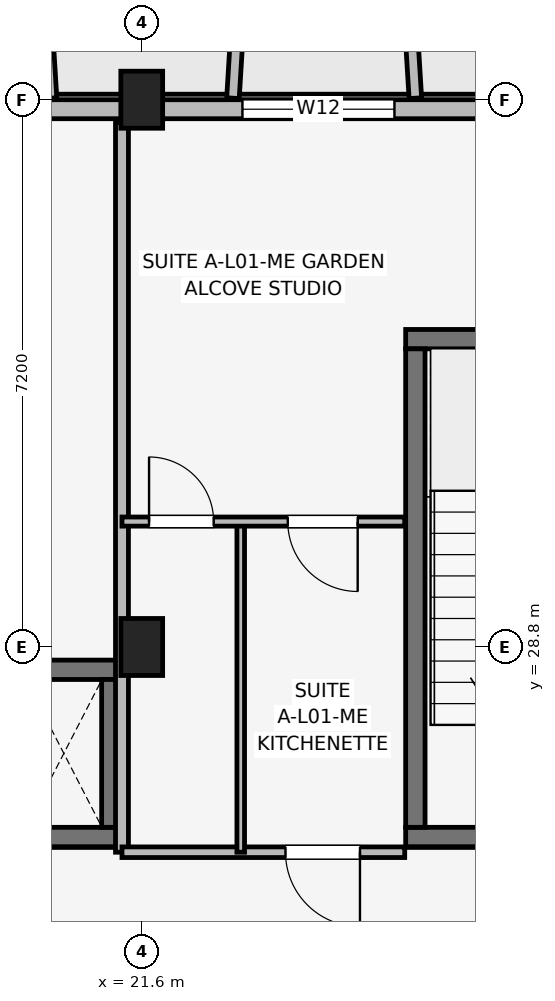
"""IFC4 building model, lengths in metres.
Left out: names, types, materials, properties, quantities, classifications, styles, units other than length and angle.
Written with IfcOpenShell. Run it as: python <this file> out.ifc"""

import sys

from ifc_helpers import new_model, si_unit, direction, frame, frame_2d, origin, origin_2d, place, context, subcontext, project, spatial, rectangle, extrude, element, fill, save


model = new_model("IFC4")
c1 = context("Model", 3, precision=1e-05, world=origin(), true_north=direction((0.0, 1.0)))
c2 = subcontext(c1, "Body", "Model", "MODEL_VIEW")
j1 = project(units=[si_unit("LENGTHUNIT", "METRE"), si_unit("PLANEANGLEUNIT", "RADIAN")], contexts=[c1])
p1 = place(None, origin())
s1 = spatial("IfcSite", under=j1, at=p1, CompositionType="ELEMENT")
p2 = place(p1, origin())
s2 = spatial("IfcBuilding", under=s1, at=p2, CompositionType="ELEMENT")
p3 = place(p2, frame((0.0, 0.0, 4.5)))
s3 = spatial("IfcBuildingStorey", under=s2, at=p3, CompositionType="ELEMENT", Elevation=4.5)
for number, where, z_axis, x_axis in (
    (1, (21.6, 28.8, 0.0), (0.0, 0.0, 1.0), (1.0, 0.0, 0.0)),
    (2, (21.6, 36.0, 0.0), (0.0, 0.0, 1.0), (1.0, 0.0, 0.0)),
):
    element("IfcColumn", number, at=place(p3, frame(where, z_axis=z_axis, x_axis=x_axis)), inside=s3, PredefinedType="COLUMN", context=c2, shape_type="SweptSolid", body=[
        extrude(rectangle(XDim=0.55, YDim=0.75, at=origin_2d()), origin(), (0.0, 0.0, 1.0), 4.2),
    ])
p4 = place(p3, frame((25.073, 26.3, 0.0), z_axis=(0.0, 0.0, 1.0), x_axis=(1.0, 0.0, 0.0)))
e3 = element("IfcWall", 3, at=p4, inside=s3, PredefinedType="SHEAR", context=c2, shape_type="SweptSolid", body=[
    extrude(rectangle(XDim=3.305, YDim=0.255, at=frame_2d((1.652, 0.0))), origin(), (0.0, 0.0, 1.0), 4.2),
])
p5 = place(p4, frame((1.127, 0.0, 0.0)))
e4 = element("IfcOpeningElement", 4, at=p5, cuts=e3, PredefinedType="OPENING", context=c2, shape_type="SweptSolid", body=[
    extrude(rectangle(XDim=1.05, YDim=2.12, at=frame_2d((0.525, 1.06))), frame((0.0, 0.137, 0.0), z_axis=(0.0, -1.0, 0.0), x_axis=(1.0, 0.0, 0.0)), (0.0, 0.0, 1.0), 0.275),
])
p6 = place(p3, frame((25.073, 32.85, 0.0), z_axis=(0.0, 0.0, 1.0), x_axis=(1.0, 0.0, 0.0)))
e5 = element("IfcWall", 5, at=p6, inside=s3, PredefinedType="SHEAR", context=c2, shape_type="SweptSolid", body=[
    extrude(rectangle(XDim=3.305, YDim=0.255, at=frame_2d((1.652, 0.0))), origin(), (0.0, 0.0, 1.0), 4.2),
])
p7 = place(p3, frame((25.2, 26.427, 0.0), z_axis=(0.0, 0.0, 1.0), x_axis=(0.0, 1.0, 0.0)))
e6 = element("IfcWall", 6, at=p7, inside=s3, PredefinedType="SHEAR", context=c2, shape_type="SweptSolid", body=[
    extrude(rectangle(XDim=6.295, YDim=0.255, at=frame_2d((3.147, 0.0))), origin(), (0.0, 0.0, 1.0), 4.2),
])
for number, where, z_axis, x_axis in (
    (7, (19.522, 26.3, 0.0), (0.0, 0.0, 1.0), (1.0, 0.0, 0.0)),
    (8, (19.522, 28.5, 0.0), (0.0, 0.0, 1.0), (1.0, 0.0, 0.0)),
):
    element("IfcWall", number, at=place(p3, frame(where, z_axis=z_axis, x_axis=x_axis)), inside=s3, PredefinedType="SHEAR", context=c2, shape_type="SweptSolid", body=[
        extrude(rectangle(XDim=1.805, YDim=0.255, at=frame_2d((0.902, 0.0))), origin(), (0.0, 0.0, 1.0), 4.2),
    ])
p8 = place(p3, frame((21.2, 26.427, 0.0), z_axis=(0.0, 0.0, 1.0), x_axis=(0.0, 1.0, 0.0)))
e9 = element("IfcWall", 9, at=p8, inside=s3, PredefinedType="SHEAR", context=c2, shape_type="SweptSolid", body=[
    extrude(rectangle(XDim=1.945, YDim=0.255, at=frame_2d((0.973, 0.0))), origin(), (0.0, 0.0, 1.0), 4.2),
])
p9 = place(p3, frame((32.6, 35.875, 0.0), z_axis=(0.0, 0.0, 1.0), x_axis=(-1.0, 0.0, 0.0)))
e10 = element("IfcWall", 10, at=p9, inside=s3, PredefinedType="SOLIDWALL", context=c2, shape_type="SweptSolid", body=[
    extrude(rectangle(XDim=29.2, YDim=0.25, at=frame_2d((14.6, 0.0))), origin(), (0.0, 0.0, 1.0), 3.48),
])
p10 = place(p9, frame((28.7, 0.0, 0.0), z_axis=(0.0, 0.0, 1.0), x_axis=(-1.0, 0.0, 0.0)))
e11 = element("IfcOpeningElement", 11, at=p10, cuts=e10, PredefinedType="OPENING", context=c2, shape_type="SweptSolid", body=[
    extrude(rectangle(XDim=1.8, YDim=2.15, at=frame_2d((0.9, 1.075))), frame((0.0, 0.135, 0.0), z_axis=(0.0, -1.0, 0.0), x_axis=(1.0, 0.0, 0.0)), (0.0, 0.0, 1.0), 0.27),
])
p11 = place(p9, frame((2.15, 0.0, 0.0), z_axis=(0.0, 0.0, 1.0), x_axis=(-1.0, 0.0, 0.0)))
e12 = element("IfcOpeningElement", 12, at=p11, cuts=e10, PredefinedType="OPENING", context=c2, shape_type="SweptSolid", body=[
    extrude(rectangle(XDim=1.5, YDim=2.15, at=frame_2d((0.75, 1.075))), frame((0.0, 0.135, 0.0), z_axis=(0.0, -1.0, 0.0), x_axis=(1.0, 0.0, 0.0)), (0.0, 0.0, 1.0), 0.27),
])
p12 = place(p9, frame((14.955, 0.0, 0.5)))
e13 = element("IfcOpeningElement", 13, at=p12, cuts=e10, PredefinedType="OPENING", context=c2, shape_type="SweptSolid", body=[
    extrude(rectangle(XDim=0.9, YDim=1.8, at=frame_2d((0.45, 0.9))), frame((0.0, 0.135, 0.0), z_axis=(0.0, -1.0, 0.0), x_axis=(1.0, 0.0, 0.0)), (0.0, 0.0, 1.0), 0.27),
])
p13 = place(p9, frame((7.675, 0.0, 0.7)))
e14 = element("IfcOpeningElement", 14, at=p13, cuts=e10, PredefinedType="OPENING", context=c2, shape_type="SweptSolid", body=[
    extrude(rectangle(XDim=2.0, YDim=1.65, at=frame_2d((1.0, 0.825))), frame((0.0, 0.135, 0.0), z_axis=(0.0, -1.0, 0.0), x_axis=(1.0, 0.0, 0.0)), (0.0, 0.0, 1.0), 0.27),
])
p14 = place(p9, frame((19.57, 0.0, 0.7)))
e15 = element("IfcOpeningElement", 15, at=p14, cuts=e10, PredefinedType="OPENING", context=c2, shape_type="SweptSolid", body=[
    extrude(rectangle(XDim=1.86, YDim=1.6, at=frame_2d((0.93, 0.8))), frame((0.0, 0.135, 0.0), z_axis=(0.0, -1.0, 0.0), x_axis=(1.0, 0.0, 0.0)), (0.0, 0.0, 1.0), 0.27),
])
p15 = place(p3, frame((20.4, 36.02, 0.0), z_axis=(0.0, 0.0, 1.0), x_axis=(-0.061046865508, 0.998134900808, 0.0)))
e16 = element("IfcWall", 16, at=p15, inside=s3, PredefinedType="ELEMENTEDWALL", context=c2, shape_type="SweptSolid", body=[
    extrude(rectangle(XDim=1.964, YDim=0.165, at=frame_2d((0.982, 0.0))), origin(), (0.0, 0.0, 1.0), 3.6),
])
for number, where, z_axis, x_axis in (
    (17, (22.8, 36.02, 0.0), (0.0, 0.0, 1.0), (0.061, 0.998, 0.0)),
    (18, (25.2, 36.02, 0.0), (0.0, 0.0, 1.0), (-0.061, 0.998, 0.0)),
):
    element("IfcWall", number, at=place(p3, frame(where, z_axis=z_axis, x_axis=x_axis)), inside=s3, PredefinedType="ELEMENTEDWALL", context=c2, shape_type="SweptSolid", body=[
        extrude(rectangle(XDim=1.964, YDim=0.165, at=frame_2d((0.982, 0.0))), origin(), (0.0, 0.0, 1.0), 3.63),
    ])
p16 = place(p3, frame((21.34, 26.1, 0.0), z_axis=(0.0, 0.0, 1.0), x_axis=(0.0, 1.0, 0.0)))
e19 = element("IfcWall", 19, at=p16, inside=s3, PredefinedType="PARTITIONING", context=c2, shape_type="SweptSolid", body=[
    extrude(rectangle(XDim=9.6, YDim=0.17, at=frame_2d((4.8, 0.0))), origin(), (0.0, 0.0, 1.0), 3.25),
])
p17 = place(p3, frame((21.34, 26.1, 0.0), z_axis=(0.0, 0.0, 1.0), x_axis=(1.0, 0.0, 0.0)))
e20 = element("IfcWall", 20, at=p17, inside=s3, PredefinedType="PARTITIONING", context=c2, shape_type="SweptSolid", body=[
    extrude(rectangle(XDim=3.72, YDim=0.14, at=frame_2d((1.86, 0.0))), origin(), (0.0, 0.0, 1.0), 3.25),
])
p18 = place(p17, frame((3.131, 0.0, 0.0), z_axis=(0.0, 0.0, 1.0), x_axis=(-1.0, 0.0, 0.0)))
e21 = element("IfcOpeningElement", 21, at=p18, cuts=e20, PredefinedType="OPENING", context=c2, shape_type="SweptSolid", body=[
    extrude(rectangle(XDim=0.98, YDim=2.1, at=frame_2d((0.49, 1.05))), frame((0.0, 0.08, 0.0), z_axis=(0.0, -1.0, 0.0), x_axis=(1.0, 0.0, 0.0)), (0.0, 0.0, 1.0), 0.16),
])
p19 = place(p3, frame((22.902, 26.1, 0.0), z_axis=(0.0, 0.0, 1.0), x_axis=(0.0, 1.0, 0.0)))
e22 = element("IfcWall", 22, at=p19, inside=s3, PredefinedType="PARTITIONING", context=c2, shape_type="SweptSolid", body=[
    extrude(rectangle(XDim=4.35, YDim=0.1, at=frame_2d((2.175, 0.0))), origin(), (0.0, 0.0, 1.0), 3.25),
])
p20 = place(p3, frame((21.34, 30.45, 0.0), z_axis=(0.0, 0.0, 1.0), x_axis=(1.0, 0.0, 0.0)))
e23 = element("IfcWall", 23, at=p20, inside=s3, PredefinedType="PARTITIONING", context=c2, shape_type="SweptSolid", body=[
    extrude(rectangle(XDim=3.72, YDim=0.12, at=frame_2d((1.86, 0.0))), origin(), (0.0, 0.0, 1.0), 3.25),
])
p21 = place(p20, frame((0.356, 0.0, 0.0)))
e24 = element("IfcOpeningElement", 24, at=p21, cuts=e23, PredefinedType="OPENING", context=c2, shape_type="SweptSolid", body=[
    extrude(rectangle(XDim=0.85, YDim=2.08, at=frame_2d((0.425, 1.04))), frame((0.0, 0.07, 0.0), z_axis=(0.0, -1.0, 0.0), x_axis=(1.0, 0.0, 0.0)), (0.0, 0.0, 1.0), 0.14),
])
p22 = place(p20, frame((3.101, 0.0, 0.0), z_axis=(0.0, 0.0, 1.0), x_axis=(-1.0, 0.0, 0.0)))
e25 = element("IfcOpeningElement", 25, at=p22, cuts=e23, PredefinedType="OPENING", context=c2, shape_type="SweptSolid", body=[
    extrude(rectangle(XDim=0.92, YDim=2.08, at=frame_2d((0.46, 1.04))), frame((0.0, 0.07, 0.0), z_axis=(0.0, -1.0, 0.0), x_axis=(1.0, 0.0, 0.0)), (0.0, 0.0, 1.0), 0.14),
])
p23 = place(p13, origin())
e26 = element("IfcWindow", 26, at=p23, inside=s3, PartitioningType="SINGLE_PANEL", PredefinedType="WINDOW", context=c2, shape_type="SweptSolid", body=[
    extrude(rectangle(XDim=2.0, YDim=1.65, at=frame_2d((1.0, 0.825))), frame((0.0, 0.03, 0.0), z_axis=(0.0, -1.0, 0.0), x_axis=(1.0, 0.0, 0.0)), (0.0, 0.0, 1.0), 0.06),
])
fill(e14, e26)
p24 = place(p18, origin())
e27 = element("IfcDoor", 27, at=p24, inside=s3, OperationType="SINGLE_SWING_RIGHT", PredefinedType="DOOR", context=c2, shape_type="SweptSolid", body=[
    extrude(rectangle(XDim=0.98, YDim=2.1, at=frame_2d((0.49, 1.05))), frame((0.0, 0.025, 0.0), z_axis=(0.0, -1.0, 0.0), x_axis=(1.0, 0.0, 0.0)), (0.0, 0.0, 1.0), 0.05),
])
fill(e21, e27)
p25 = place(p21, origin())
e28 = element("IfcDoor", 28, at=p25, inside=s3, OperationType="SINGLE_SWING_LEFT", PredefinedType="DOOR", context=c2, shape_type="SweptSolid", body=[
    extrude(rectangle(XDim=0.85, YDim=2.08, at=frame_2d((0.425, 1.04))), frame((0.0, 0.025, 0.0), z_axis=(0.0, -1.0, 0.0), x_axis=(1.0, 0.0, 0.0)), (0.0, 0.0, 1.0), 0.05),
])
fill(e24, e28)
p26 = place(p22, origin())
e29 = element("IfcDoor", 29, at=p26, inside=s3, OperationType="SINGLE_SWING_RIGHT", PredefinedType="DOOR", context=c2, shape_type="SweptSolid", body=[
    extrude(rectangle(XDim=0.92, YDim=2.08, at=frame_2d((0.46, 1.04))), frame((0.0, 0.025, 0.0), z_axis=(0.0, -1.0, 0.0), x_axis=(1.0, 0.0, 0.0)), (0.0, 0.0, 1.0), 0.05),
])
fill(e25, e29)
save(model, sys.argv[1])
